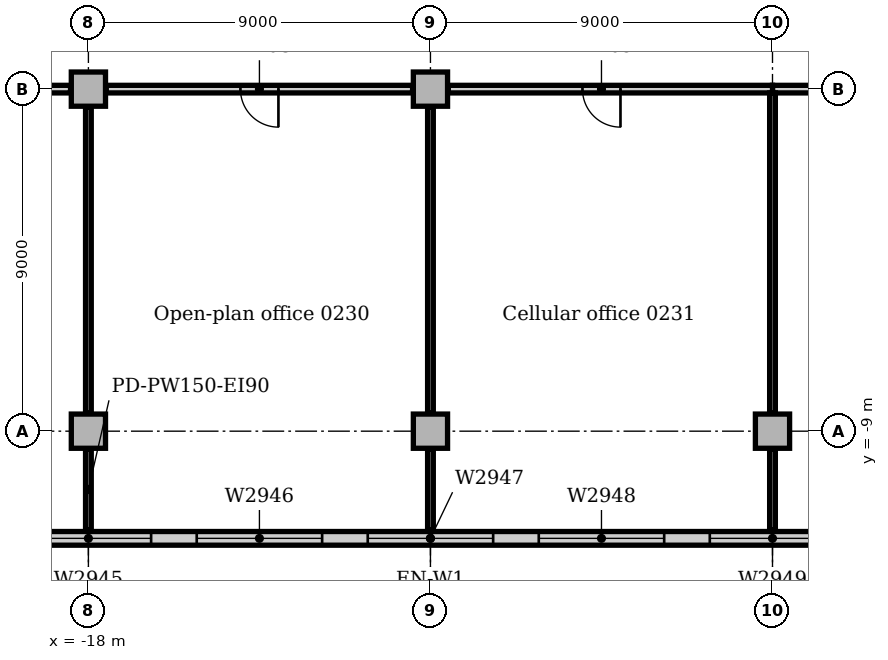
"""IFC4 building model, lengths in metres.
Left out: names, types, materials, properties, quantities, classifications, styles, units other than length and angle.
Written with IfcOpenShell. Run it as: python <this file> out.ifc"""

import sys

from ifc_helpers import new_model, si_unit, direction, frame, frame_2d, origin, origin_with_axes, origin_2d, place, context, subcontext, project, spatial, rectangle, extrude, element, fill, save


model = new_model("IFC4")
c1 = context("Model", 3, precision=1e-05, world=origin(), true_north=direction((0.0, 1.0)))
c2 = subcontext(c1, "Body", "Model", "MODEL_VIEW")
j1 = project(units=[si_unit("LENGTHUNIT", "METRE"), si_unit("PLANEANGLEUNIT", "RADIAN")], contexts=[c1])
p1 = place(None, origin())
s1 = spatial("IfcSite", under=j1, at=p1, CompositionType="ELEMENT")
p2 = place(p1, origin())
s2 = spatial("IfcBuilding", under=s1, at=p2, CompositionType="ELEMENT")
p3 = place(p2, frame((0.0, 0.0, 11.0)))
s3 = spatial("IfcBuildingStorey", under=s2, at=p3, CompositionType="ELEMENT", Elevation=11.0)
for number, where, z_axis, x_axis in (
    (1, (-18.0, -9.0, 0.0), (0.0, 0.0, 1.0), (1.0, 0.0, 0.0)),
    (2, (-18.0, 0.0, 0.0), (0.0, 0.0, 1.0), (1.0, 0.0, 0.0)),
    (3, (-9.0, -9.0, 0.0), (0.0, 0.0, 1.0), (1.0, 0.0, 0.0)),
    (4, (-9.0, 0.0, 0.0), (0.0, 0.0, 1.0), (1.0, 0.0, 0.0)),
    (5, (0.0, -9.0, 0.0), (0.0, 0.0, 1.0), (1.0, 0.0, 0.0)),
):
    element("IfcColumn", number, at=place(p3, frame(where, z_axis=z_axis, x_axis=x_axis)), inside=s3, PredefinedType="COLUMN", context=c2, shape_type="SweptSolid", body=[
        extrude(rectangle(XDim=0.9, YDim=0.9, at=origin_2d()), origin(), (0.0, 0.0, 1.0), 4.7),
    ])
p4 = place(p3, frame((-81.0, -11.82, 0.0), z_axis=(0.0, 0.0, 1.0), x_axis=(1.0, 0.0, 0.0)))
e6 = element("IfcWall", 6, at=p4, inside=s3, PredefinedType="STANDARD", context=c2, shape_type="SweptSolid", body=[
    extrude(rectangle(XDim=144.0, YDim=0.36, at=frame_2d((72.0, 0.0))), origin(), (0.0, 0.0, 1.0), 4.7),
])
p5 = place(p4, frame((2.85, 0.0, 0.9)))
e7 = element("IfcOpeningElement", 7, at=p5, cuts=e6, PredefinedType="OPENING", context=c2, shape_type="SweptSolid", body=[
    extrude(rectangle(XDim=3.3, YDim=2.4, at=frame_2d((1.65, 1.2))), frame((0.0, 0.19, 0.0), z_axis=(0.0, -1.0, 0.0), x_axis=(1.0, 0.0, 0.0)), (0.0, 0.0, 1.0), 0.38),
])
p6 = place(p4, frame((7.35, 0.0, 0.9)))
e8 = element("IfcOpeningElement", 8, at=p6, cuts=e6, PredefinedType="OPENING", context=c2, shape_type="SweptSolid", body=[
    extrude(rectangle(XDim=3.3, YDim=2.4, at=frame_2d((1.65, 1.2))), frame((0.0, 0.19, 0.0), z_axis=(0.0, -1.0, 0.0), x_axis=(1.0, 0.0, 0.0)), (0.0, 0.0, 1.0), 0.38),
])
p7 = place(p4, frame((11.85, 0.0, 0.9)))
e9 = element("IfcOpeningElement", 9, at=p7, cuts=e6, PredefinedType="OPENING", context=c2, shape_type="SweptSolid", body=[
    extrude(rectangle(XDim=3.3, YDim=2.4, at=frame_2d((1.65, 1.2))), frame((0.0, 0.19, 0.0), z_axis=(0.0, -1.0, 0.0), x_axis=(1.0, 0.0, 0.0)), (0.0, 0.0, 1.0), 0.38),
])
p8 = place(p4, frame((16.35, 0.0, 0.9)))
e10 = element("IfcOpeningElement", 10, at=p8, cuts=e6, PredefinedType="OPENING", context=c2, shape_type="SweptSolid", body=[
    extrude(rectangle(XDim=3.3, YDim=2.4, at=frame_2d((1.65, 1.2))), frame((0.0, 0.19, 0.0), z_axis=(0.0, -1.0, 0.0), x_axis=(1.0, 0.0, 0.0)), (0.0, 0.0, 1.0), 0.38),
])
p9 = place(p4, frame((20.85, 0.0, 0.9)))
e11 = element("IfcOpeningElement", 11, at=p9, cuts=e6, PredefinedType="OPENING", context=c2, shape_type="SweptSolid", body=[
    extrude(rectangle(XDim=3.3, YDim=2.4, at=frame_2d((1.65, 1.2))), frame((0.0, 0.19, 0.0), z_axis=(0.0, -1.0, 0.0), x_axis=(1.0, 0.0, 0.0)), (0.0, 0.0, 1.0), 0.38),
])
p10 = place(p4, frame((25.35, 0.0, 0.9)))
e12 = element("IfcOpeningElement", 12, at=p10, cuts=e6, PredefinedType="OPENING", context=c2, shape_type="SweptSolid", body=[
    extrude(rectangle(XDim=3.3, YDim=2.4, at=frame_2d((1.65, 1.2))), frame((0.0, 0.19, 0.0), z_axis=(0.0, -1.0, 0.0), x_axis=(1.0, 0.0, 0.0)), (0.0, 0.0, 1.0), 0.38),
])
p11 = place(p4, frame((29.85, 0.0, 0.9)))
e13 = element("IfcOpeningElement", 13, at=p11, cuts=e6, PredefinedType="OPENING", context=c2, shape_type="SweptSolid", body=[
    extrude(rectangle(XDim=3.3, YDim=2.4, at=frame_2d((1.65, 1.2))), frame((0.0, 0.19, 0.0), z_axis=(0.0, -1.0, 0.0), x_axis=(1.0, 0.0, 0.0)), (0.0, 0.0, 1.0), 0.38),
])
p12 = place(p4, frame((34.35, 0.0, 0.9)))
e14 = element("IfcOpeningElement", 14, at=p12, cuts=e6, PredefinedType="OPENING", context=c2, shape_type="SweptSolid", body=[
    extrude(rectangle(XDim=3.3, YDim=2.4, at=frame_2d((1.65, 1.2))), frame((0.0, 0.19, 0.0), z_axis=(0.0, -1.0, 0.0), x_axis=(1.0, 0.0, 0.0)), (0.0, 0.0, 1.0), 0.38),
])
p13 = place(p4, frame((38.85, 0.0, 0.9)))
e15 = element("IfcOpeningElement", 15, at=p13, cuts=e6, PredefinedType="OPENING", context=c2, shape_type="SweptSolid", body=[
    extrude(rectangle(XDim=3.3, YDim=2.4, at=frame_2d((1.65, 1.2))), frame((0.0, 0.19, 0.0), z_axis=(0.0, -1.0, 0.0), x_axis=(1.0, 0.0, 0.0)), (0.0, 0.0, 1.0), 0.38),
])
p14 = place(p4, frame((43.35, 0.0, 0.9)))
e16 = element("IfcOpeningElement", 16, at=p14, cuts=e6, PredefinedType="OPENING", context=c2, shape_type="SweptSolid", body=[
    extrude(rectangle(XDim=3.3, YDim=2.4, at=frame_2d((1.65, 1.2))), frame((0.0, 0.19, 0.0), z_axis=(0.0, -1.0, 0.0), x_axis=(1.0, 0.0, 0.0)), (0.0, 0.0, 1.0), 0.38),
])
p15 = place(p4, frame((47.85, 0.0, 0.9)))
e17 = element("IfcOpeningElement", 17, at=p15, cuts=e6, PredefinedType="OPENING", context=c2, shape_type="SweptSolid", body=[
    extrude(rectangle(XDim=3.3, YDim=2.4, at=frame_2d((1.65, 1.2))), frame((0.0, 0.19, 0.0), z_axis=(0.0, -1.0, 0.0), x_axis=(1.0, 0.0, 0.0)), (0.0, 0.0, 1.0), 0.38),
])
p16 = place(p4, frame((52.35, 0.0, 0.9)))
e18 = element("IfcOpeningElement", 18, at=p16, cuts=e6, PredefinedType="OPENING", context=c2, shape_type="SweptSolid", body=[
    extrude(rectangle(XDim=3.3, YDim=2.4, at=frame_2d((1.65, 1.2))), frame((0.0, 0.19, 0.0), z_axis=(0.0, -1.0, 0.0), x_axis=(1.0, 0.0, 0.0)), (0.0, 0.0, 1.0), 0.38),
])
p17 = place(p4, frame((56.85, 0.0, 0.9)))
e19 = element("IfcOpeningElement", 19, at=p17, cuts=e6, PredefinedType="OPENING", context=c2, shape_type="SweptSolid", body=[
    extrude(rectangle(XDim=3.3, YDim=2.4, at=frame_2d((1.65, 1.2))), frame((0.0, 0.19, 0.0), z_axis=(0.0, -1.0, 0.0), x_axis=(1.0, 0.0, 0.0)), (0.0, 0.0, 1.0), 0.38),
])
p18 = place(p4, frame((61.35, 0.0, 0.9)))
e20 = element("IfcOpeningElement", 20, at=p18, cuts=e6, PredefinedType="OPENING", context=c2, shape_type="SweptSolid", body=[
    extrude(rectangle(XDim=3.3, YDim=2.4, at=frame_2d((1.65, 1.2))), frame((0.0, 0.19, 0.0), z_axis=(0.0, -1.0, 0.0), x_axis=(1.0, 0.0, 0.0)), (0.0, 0.0, 1.0), 0.38),
])
p19 = place(p4, frame((65.85, 0.0, 0.9)))
e21 = element("IfcOpeningElement", 21, at=p19, cuts=e6, PredefinedType="OPENING", context=c2, shape_type="SweptSolid", body=[
    extrude(rectangle(XDim=3.3, YDim=2.4, at=frame_2d((1.65, 1.2))), frame((0.0, 0.19, 0.0), z_axis=(0.0, -1.0, 0.0), x_axis=(1.0, 0.0, 0.0)), (0.0, 0.0, 1.0), 0.38),
])
p20 = place(p4, frame((70.35, 0.0, 0.9)))
e22 = element("IfcOpeningElement", 22, at=p20, cuts=e6, PredefinedType="OPENING", context=c2, shape_type="SweptSolid", body=[
    extrude(rectangle(XDim=3.3, YDim=2.4, at=frame_2d((1.65, 1.2))), frame((0.0, 0.19, 0.0), z_axis=(0.0, -1.0, 0.0), x_axis=(1.0, 0.0, 0.0)), (0.0, 0.0, 1.0), 0.38),
])
p21 = place(p4, frame((74.85, 0.0, 0.9)))
e23 = element("IfcOpeningElement", 23, at=p21, cuts=e6, PredefinedType="OPENING", context=c2, shape_type="SweptSolid", body=[
    extrude(rectangle(XDim=3.3, YDim=2.4, at=frame_2d((1.65, 1.2))), frame((0.0, 0.19, 0.0), z_axis=(0.0, -1.0, 0.0), x_axis=(1.0, 0.0, 0.0)), (0.0, 0.0, 1.0), 0.38),
])
p22 = place(p4, frame((79.35, 0.0, 0.9)))
e24 = element("IfcOpeningElement", 24, at=p22, cuts=e6, PredefinedType="OPENING", context=c2, shape_type="SweptSolid", body=[
    extrude(rectangle(XDim=3.3, YDim=2.4, at=frame_2d((1.65, 1.2))), frame((0.0, 0.19, 0.0), z_axis=(0.0, -1.0, 0.0), x_axis=(1.0, 0.0, 0.0)), (0.0, 0.0, 1.0), 0.38),
])
p23 = place(p4, frame((83.85, 0.0, 0.9)))
e25 = element("IfcOpeningElement", 25, at=p23, cuts=e6, PredefinedType="OPENING", context=c2, shape_type="SweptSolid", body=[
    extrude(rectangle(XDim=3.3, YDim=2.4, at=frame_2d((1.65, 1.2))), frame((0.0, 0.19, 0.0), z_axis=(0.0, -1.0, 0.0), x_axis=(1.0, 0.0, 0.0)), (0.0, 0.0, 1.0), 0.38),
])
p24 = place(p4, frame((88.35, 0.0, 0.9)))
e26 = element("IfcOpeningElement", 26, at=p24, cuts=e6, PredefinedType="OPENING", context=c2, shape_type="SweptSolid", body=[
    extrude(rectangle(XDim=3.3, YDim=2.4, at=frame_2d((1.65, 1.2))), frame((0.0, 0.19, 0.0), z_axis=(0.0, -1.0, 0.0), x_axis=(1.0, 0.0, 0.0)), (0.0, 0.0, 1.0), 0.38),
])
p25 = place(p4, frame((92.85, 0.0, 0.9)))
e27 = element("IfcOpeningElement", 27, at=p25, cuts=e6, PredefinedType="OPENING", context=c2, shape_type="SweptSolid", body=[
    extrude(rectangle(XDim=3.3, YDim=2.4, at=frame_2d((1.65, 1.2))), frame((0.0, 0.19, 0.0), z_axis=(0.0, -1.0, 0.0), x_axis=(1.0, 0.0, 0.0)), (0.0, 0.0, 1.0), 0.38),
])
p26 = place(p4, frame((97.35, 0.0, 0.9)))
e28 = element("IfcOpeningElement", 28, at=p26, cuts=e6, PredefinedType="OPENING", context=c2, shape_type="SweptSolid", body=[
    extrude(rectangle(XDim=3.3, YDim=2.4, at=frame_2d((1.65, 1.2))), frame((0.0, 0.19, 0.0), z_axis=(0.0, -1.0, 0.0), x_axis=(1.0, 0.0, 0.0)), (0.0, 0.0, 1.0), 0.38),
])
p27 = place(p4, frame((101.85, 0.0, 0.9)))
e29 = element("IfcOpeningElement", 29, at=p27, cuts=e6, PredefinedType="OPENING", context=c2, shape_type="SweptSolid", body=[
    extrude(rectangle(XDim=3.3, YDim=2.4, at=frame_2d((1.65, 1.2))), frame((0.0, 0.19, 0.0), z_axis=(0.0, -1.0, 0.0), x_axis=(1.0, 0.0, 0.0)), (0.0, 0.0, 1.0), 0.38),
])
p28 = place(p4, frame((106.35, 0.0, 0.9)))
e30 = element("IfcOpeningElement", 30, at=p28, cuts=e6, PredefinedType="OPENING", context=c2, shape_type="SweptSolid", body=[
    extrude(rectangle(XDim=3.3, YDim=2.4, at=frame_2d((1.65, 1.2))), frame((0.0, 0.19, 0.0), z_axis=(0.0, -1.0, 0.0), x_axis=(1.0, 0.0, 0.0)), (0.0, 0.0, 1.0), 0.38),
])
p29 = place(p4, frame((110.85, 0.0, 0.9)))
e31 = element("IfcOpeningElement", 31, at=p29, cuts=e6, PredefinedType="OPENING", context=c2, shape_type="SweptSolid", body=[
    extrude(rectangle(XDim=3.3, YDim=2.4, at=frame_2d((1.65, 1.2))), frame((0.0, 0.19, 0.0), z_axis=(0.0, -1.0, 0.0), x_axis=(1.0, 0.0, 0.0)), (0.0, 0.0, 1.0), 0.38),
])
p30 = place(p4, frame((115.35, 0.0, 0.9)))
e32 = element("IfcOpeningElement", 32, at=p30, cuts=e6, PredefinedType="OPENING", context=c2, shape_type="SweptSolid", body=[
    extrude(rectangle(XDim=3.3, YDim=2.4, at=frame_2d((1.65, 1.2))), frame((0.0, 0.19, 0.0), z_axis=(0.0, -1.0, 0.0), x_axis=(1.0, 0.0, 0.0)), (0.0, 0.0, 1.0), 0.38),
])
p31 = place(p4, frame((119.85, 0.0, 0.9)))
e33 = element("IfcOpeningElement", 33, at=p31, cuts=e6, PredefinedType="OPENING", context=c2, shape_type="SweptSolid", body=[
    extrude(rectangle(XDim=3.3, YDim=2.4, at=frame_2d((1.65, 1.2))), frame((0.0, 0.19, 0.0), z_axis=(0.0, -1.0, 0.0), x_axis=(1.0, 0.0, 0.0)), (0.0, 0.0, 1.0), 0.38),
])
p32 = place(p4, frame((124.35, 0.0, 0.9)))
e34 = element("IfcOpeningElement", 34, at=p32, cuts=e6, PredefinedType="OPENING", context=c2, shape_type="SweptSolid", body=[
    extrude(rectangle(XDim=3.3, YDim=2.4, at=frame_2d((1.65, 1.2))), frame((0.0, 0.19, 0.0), z_axis=(0.0, -1.0, 0.0), x_axis=(1.0, 0.0, 0.0)), (0.0, 0.0, 1.0), 0.38),
])
p33 = place(p4, frame((128.85, 0.0, 0.9)))
e35 = element("IfcOpeningElement", 35, at=p33, cuts=e6, PredefinedType="OPENING", context=c2, shape_type="SweptSolid", body=[
    extrude(rectangle(XDim=3.3, YDim=2.4, at=frame_2d((1.65, 1.2))), frame((0.0, 0.19, 0.0), z_axis=(0.0, -1.0, 0.0), x_axis=(1.0, 0.0, 0.0)), (0.0, 0.0, 1.0), 0.38),
])
p34 = place(p4, frame((133.35, 0.0, 0.9)))
e36 = element("IfcOpeningElement", 36, at=p34, cuts=e6, PredefinedType="OPENING", context=c2, shape_type="SweptSolid", body=[
    extrude(rectangle(XDim=3.3, YDim=2.4, at=frame_2d((1.65, 1.2))), frame((0.0, 0.19, 0.0), z_axis=(0.0, -1.0, 0.0), x_axis=(1.0, 0.0, 0.0)), (0.0, 0.0, 1.0), 0.38),
])
p35 = place(p4, frame((137.85, 0.0, 0.9)))
e37 = element("IfcOpeningElement", 37, at=p35, cuts=e6, PredefinedType="OPENING", context=c2, shape_type="SweptSolid", body=[
    extrude(rectangle(XDim=3.3, YDim=2.4, at=frame_2d((1.65, 1.2))), frame((0.0, 0.19, 0.0), z_axis=(0.0, -1.0, 0.0), x_axis=(1.0, 0.0, 0.0)), (0.0, 0.0, 1.0), 0.38),
])
p36 = place(p3, origin_with_axes())
e38 = element("IfcWall", 38, at=p36, inside=s3, PredefinedType="PARTITIONING", context=c2, shape_type="SweptSolid", body=[
    extrude(rectangle(XDim=9.0, YDim=0.2, at=frame_2d((4.5, 0.0))), origin(), (0.0, 0.0, 1.0), 4.7),
])
p37 = place(p36, frame((4.3, 0.0, 0.0)))
e39 = element("IfcOpeningElement", 39, at=p37, cuts=e38, PredefinedType="OPENING", context=c2, shape_type="SweptSolid", body=[
    extrude(rectangle(XDim=1.0, YDim=2.1, at=frame_2d((0.5, 1.05))), frame((0.0, 0.11, 0.0), z_axis=(0.0, -1.0, 0.0), x_axis=(1.0, 0.0, 0.0)), (0.0, 0.0, 1.0), 0.22),
])
p38 = place(p3, frame((-27.0, 0.0, 0.0), z_axis=(0.0, 0.0, 1.0), x_axis=(1.0, 0.0, 0.0)))
e40 = element("IfcWall", 40, at=p38, inside=s3, PredefinedType="PARTITIONING", context=c2, shape_type="SweptSolid", body=[
    extrude(rectangle(XDim=8.53, YDim=0.2, at=frame_2d((4.265, 0.0))), origin(), (0.0, 0.0, 1.0), 4.7),
])
p39 = place(p38, frame((4.0, 0.0, 0.0)))
e41 = element("IfcOpeningElement", 41, at=p39, cuts=e40, PredefinedType="OPENING", context=c2, shape_type="SweptSolid", body=[
    extrude(rectangle(XDim=1.0, YDim=2.1, at=frame_2d((0.5, 1.05))), frame((0.0, 0.11, 0.0), z_axis=(0.0, -1.0, 0.0), x_axis=(1.0, 0.0, 0.0)), (0.0, 0.0, 1.0), 0.22),
])
p40 = place(p3, frame((-17.53, 0.0, 0.0), z_axis=(0.0, 0.0, 1.0), x_axis=(1.0, 0.0, 0.0)))
e42 = element("IfcWall", 42, at=p40, inside=s3, PredefinedType="PARTITIONING", context=c2, shape_type="SweptSolid", body=[
    extrude(rectangle(XDim=8.06, YDim=0.2, at=frame_2d((4.03, 0.0))), origin(), (0.0, 0.0, 1.0), 4.7),
])
p41 = place(p40, frame((3.53, 0.0, 0.0)))
e43 = element("IfcOpeningElement", 43, at=p41, cuts=e42, PredefinedType="OPENING", context=c2, shape_type="SweptSolid", body=[
    extrude(rectangle(XDim=1.0, YDim=2.1, at=frame_2d((0.5, 1.05))), frame((0.0, 0.11, 0.0), z_axis=(0.0, -1.0, 0.0), x_axis=(1.0, 0.0, 0.0)), (0.0, 0.0, 1.0), 0.22),
])
p42 = place(p3, frame((-8.53, 0.0, 0.0), z_axis=(0.0, 0.0, 1.0), x_axis=(1.0, 0.0, 0.0)))
e44 = element("IfcWall", 44, at=p42, inside=s3, PredefinedType="PARTITIONING", context=c2, shape_type="SweptSolid", body=[
    extrude(rectangle(XDim=8.53, YDim=0.2, at=frame_2d((4.265, 0.0))), origin(), (0.0, 0.0, 1.0), 4.7),
])
p43 = place(p42, frame((3.53, 0.0, 0.0)))
e45 = element("IfcOpeningElement", 45, at=p43, cuts=e44, PredefinedType="OPENING", context=c2, shape_type="SweptSolid", body=[
    extrude(rectangle(XDim=1.0, YDim=2.1, at=frame_2d((0.5, 1.05))), frame((0.0, 0.11, 0.0), z_axis=(0.0, -1.0, 0.0), x_axis=(1.0, 0.0, 0.0)), (0.0, 0.0, 1.0), 0.22),
])
p44 = place(p3, frame((-18.0, -11.6, 0.0), z_axis=(0.0, 0.0, 1.0), x_axis=(0.0, 1.0, 0.0)))
e46 = element("IfcWall", 46, at=p44, inside=s3, PredefinedType="PARTITIONING", context=c2, shape_type="SweptSolid", body=[
    extrude(rectangle(XDim=2.13, YDim=0.15, at=frame_2d((1.065, 0.0))), origin(), (0.0, 0.0, 1.0), 4.7),
])
p45 = place(p3, frame((-18.0, -8.53, 0.0), z_axis=(0.0, 0.0, 1.0), x_axis=(0.0, 1.0, 0.0)))
e47 = element("IfcWall", 47, at=p45, inside=s3, PredefinedType="PARTITIONING", context=c2, shape_type="SweptSolid", body=[
    extrude(rectangle(XDim=8.06, YDim=0.15, at=frame_2d((4.03, 0.0))), origin(), (0.0, 0.0, 1.0), 4.7),
])
p46 = place(p3, frame((-9.0, -11.6, 0.0), z_axis=(0.0, 0.0, 1.0), x_axis=(0.0, 1.0, 0.0)))
e48 = element("IfcWall", 48, at=p46, inside=s3, PredefinedType="PARTITIONING", context=c2, shape_type="SweptSolid", body=[
    extrude(rectangle(XDim=2.13, YDim=0.15, at=frame_2d((1.065, 0.0))), origin(), (0.0, 0.0, 1.0), 4.7),
])
p47 = place(p3, frame((-9.0, -8.53, 0.0), z_axis=(0.0, 0.0, 1.0), x_axis=(0.0, 1.0, 0.0)))
e49 = element("IfcWall", 49, at=p47, inside=s3, PredefinedType="PARTITIONING", context=c2, shape_type="SweptSolid", body=[
    extrude(rectangle(XDim=8.06, YDim=0.15, at=frame_2d((4.03, 0.0))), origin(), (0.0, 0.0, 1.0), 4.7),
])
p48 = place(p3, frame((0.0, -11.6, 0.0), z_axis=(0.0, 0.0, 1.0), x_axis=(0.0, 1.0, 0.0)))
e50 = element("IfcWall", 50, at=p48, inside=s3, PredefinedType="PARTITIONING", context=c2, shape_type="SweptSolid", body=[
    extrude(rectangle(XDim=2.13, YDim=0.15, at=frame_2d((1.065, 0.0))), origin(), (0.0, 0.0, 1.0), 4.7),
])
p49 = place(p3, frame((0.0, -8.53, 0.0), z_axis=(0.0, 0.0, 1.0), x_axis=(0.0, 1.0, 0.0)))
e51 = element("IfcWall", 51, at=p49, inside=s3, PredefinedType="PARTITIONING", context=c2, shape_type="SweptSolid", body=[
    extrude(rectangle(XDim=8.43, YDim=0.15, at=frame_2d((4.215, 0.0))), origin(), (0.0, 0.0, 1.0), 4.7),
])
p50 = place(p18, origin())
e52 = element("IfcWindow", 52, at=p50, inside=s3, PartitioningType="SINGLE_PANEL", PredefinedType="WINDOW", context=c2, shape_type="SweptSolid", body=[
    extrude(rectangle(XDim=3.3, YDim=2.4, at=frame_2d((1.65, 1.2))), frame((0.0, 0.13, 0.0), z_axis=(0.0, -1.0, 0.0), x_axis=(1.0, 0.0, 0.0)), (0.0, 0.0, 1.0), 0.06),
])
fill(e20, e52)
p51 = place(p19, origin())
e53 = element("IfcWindow", 53, at=p51, inside=s3, PartitioningType="SINGLE_PANEL", PredefinedType="WINDOW", context=c2, shape_type="SweptSolid", body=[
    extrude(rectangle(XDim=3.3, YDim=2.4, at=frame_2d((1.65, 1.2))), frame((0.0, 0.13, 0.0), z_axis=(0.0, -1.0, 0.0), x_axis=(1.0, 0.0, 0.0)), (0.0, 0.0, 1.0), 0.06),
])
fill(e21, e53)
p52 = place(p20, origin())
e54 = element("IfcWindow", 54, at=p52, inside=s3, PartitioningType="SINGLE_PANEL", PredefinedType="WINDOW", context=c2, shape_type="SweptSolid", body=[
    extrude(rectangle(XDim=3.3, YDim=2.4, at=frame_2d((1.65, 1.2))), frame((0.0, 0.13, 0.0), z_axis=(0.0, -1.0, 0.0), x_axis=(1.0, 0.0, 0.0)), (0.0, 0.0, 1.0), 0.06),
])
fill(e22, e54)
p53 = place(p21, origin())
e55 = element("IfcWindow", 55, at=p53, inside=s3, PartitioningType="SINGLE_PANEL", PredefinedType="WINDOW", context=c2, shape_type="SweptSolid", body=[
    extrude(rectangle(XDim=3.3, YDim=2.4, at=frame_2d((1.65, 1.2))), frame((0.0, 0.13, 0.0), z_axis=(0.0, -1.0, 0.0), x_axis=(1.0, 0.0, 0.0)), (0.0, 0.0, 1.0), 0.06),
])
fill(e23, e55)
p54 = place(p22, origin())
e56 = element("IfcWindow", 56, at=p54, inside=s3, PartitioningType="SINGLE_PANEL", PredefinedType="WINDOW", context=c2, shape_type="SweptSolid", body=[
    extrude(rectangle(XDim=3.3, YDim=2.4, at=frame_2d((1.65, 1.2))), frame((0.0, 0.13, 0.0), z_axis=(0.0, -1.0, 0.0), x_axis=(1.0, 0.0, 0.0)), (0.0, 0.0, 1.0), 0.06),
])
fill(e24, e56)
p55 = place(p41, frame((1.0, 0.0, 0.0), z_axis=(0.0, 0.0, 1.0), x_axis=(-1.0, 0.0, 0.0)))
e57 = element("IfcDoor", 57, at=p55, inside=s3, OperationType="SINGLE_SWING_LEFT", PredefinedType="DOOR", context=c2, shape_type="SweptSolid", body=[
    extrude(rectangle(XDim=1.0, YDim=2.1, at=frame_2d((0.5, 1.05))), frame((0.0, 0.025, 0.0), z_axis=(0.0, -1.0, 0.0), x_axis=(1.0, 0.0, 0.0)), (0.0, 0.0, 1.0), 0.05),
])
fill(e43, e57)
p56 = place(p43, frame((1.0, 0.0, 0.0), z_axis=(0.0, 0.0, 1.0), x_axis=(-1.0, 0.0, 0.0)))
e58 = element("IfcDoor", 58, at=p56, inside=s3, OperationType="SINGLE_SWING_LEFT", PredefinedType="DOOR", context=c2, shape_type="SweptSolid", body=[
    extrude(rectangle(XDim=1.0, YDim=2.1, at=frame_2d((0.5, 1.05))), frame((0.0, 0.025, 0.0), z_axis=(0.0, -1.0, 0.0), x_axis=(1.0, 0.0, 0.0)), (0.0, 0.0, 1.0), 0.05),
])
fill(e45, e58)
save(model, sys.argv[1])
